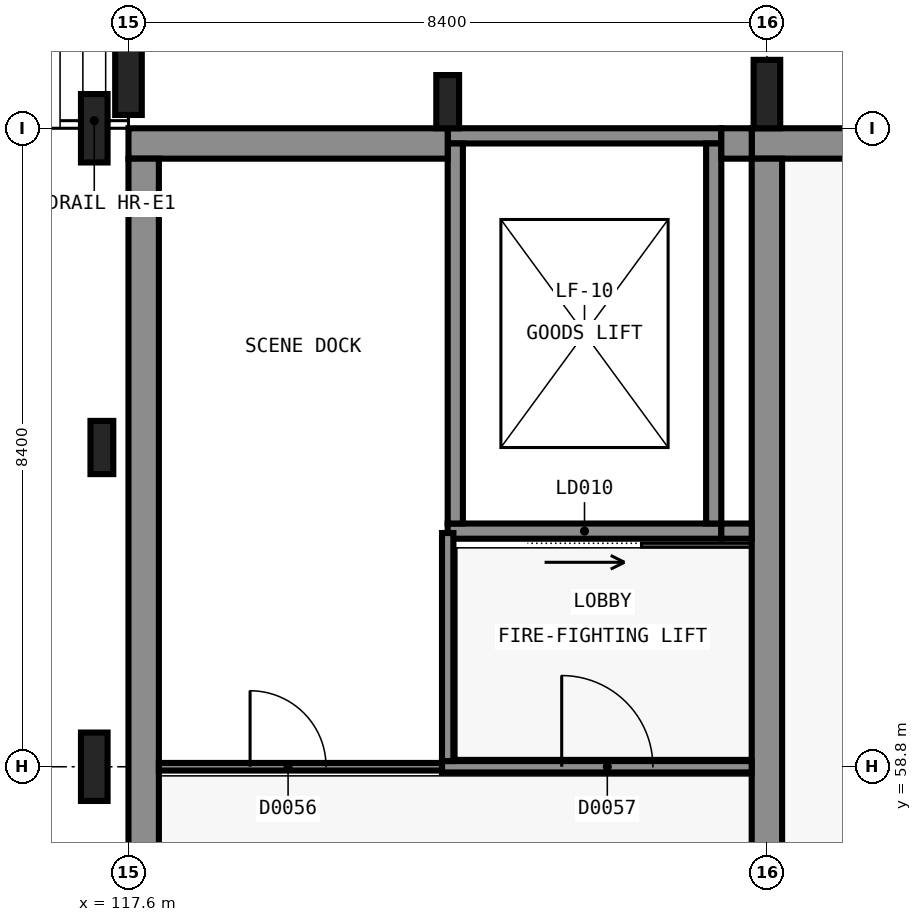
"""IFC4 building model, lengths in metres.
Left out: names, types, materials, properties, quantities, classifications, styles, units other than length and angle.
Written with IfcOpenShell. Run it as: python <this file> out.ifc"""

import sys

from ifc_helpers import new_model, si_unit, direction, frame, frame_2d, origin, origin_2d, place, context, subcontext, project, spatial, rectangle, extrude, element, fill, save


model = new_model("IFC4")
c1 = context("Model", 3, precision=1e-05, world=origin(), true_north=direction((0.0, 1.0)))
c2 = subcontext(c1, "Body", "Model", "MODEL_VIEW")
j1 = project(units=[si_unit("LENGTHUNIT", "METRE"), si_unit("PLANEANGLEUNIT", "RADIAN")], contexts=[c1])
p1 = place(None, origin())
s1 = spatial("IfcSite", under=j1, at=p1, CompositionType="ELEMENT")
p2 = place(p1, origin())
s2 = spatial("IfcBuilding", under=s1, at=p2, CompositionType="ELEMENT")
p3 = place(p2, origin())
s3 = spatial("IfcBuildingStorey", under=s2, at=p3, CompositionType="ELEMENT", Elevation=0.0)
p4 = place(p3, frame((125.4, 61.9, -1.6), z_axis=(0.0, 0.0, 1.0), x_axis=(-1.0, 0.0, 0.0)))
e1 = element("IfcWall", 1, at=p4, inside=s3, PredefinedType="SHEAR", context=c2, shape_type="SweptSolid", body=[
    extrude(rectangle(XDim=3.6, YDim=0.2, at=frame_2d((1.8, 0.0))), origin(), (0.0, 0.0, 1.0), 7.0),
])
p5 = place(p4, frame((1.05, 0.0, 1.6)))
e2 = element("IfcOpeningElement", 2, at=p5, cuts=e1, PredefinedType="OPENING", context=c2, shape_type="SweptSolid", body=[
    extrude(rectangle(XDim=1.5, YDim=2.3, at=frame_2d((0.75, 1.15))), frame((0.0, 0.11, 0.0), z_axis=(0.0, -1.0, 0.0), x_axis=(1.0, 0.0, 0.0)), (0.0, 0.0, 1.0), 0.22),
])
p6 = place(p3, frame((121.8, 67.1, -1.6), z_axis=(0.0, 0.0, 1.0), x_axis=(1.0, 0.0, 0.0)))
e3 = element("IfcWall", 3, at=p6, inside=s3, PredefinedType="SHEAR", context=c2, shape_type="SweptSolid", body=[
    extrude(rectangle(XDim=3.6, YDim=0.2, at=frame_2d((1.8, 0.0))), origin(), (0.0, 0.0, 1.0), 7.0),
])
for number, where, z_axis, x_axis in (
    (4, (121.9, 62.0, -1.6), (0.0, 0.0, 1.0), (0.0, 1.0, 0.0)),
    (5, (125.3, 67.0, -1.6), (0.0, 0.0, 1.0), (0.0, -1.0, 0.0)),
):
    element("IfcWall", number, at=place(p3, frame(where, z_axis=z_axis, x_axis=x_axis)), inside=s3, PredefinedType="SHEAR", context=c2, shape_type="SweptSolid", body=[
        extrude(rectangle(XDim=5.0, YDim=0.2, at=frame_2d((2.5, 0.0))), origin(), (0.0, 0.0, 1.0), 7.0),
    ])
p7 = place(p3, frame((125.8, 67.0, -0.3), z_axis=(0.0, 0.0, 1.0), x_axis=(1.0, 0.0, 0.0)))
e6 = element("IfcWall", 6, at=p7, inside=s3, PredefinedType="SHEAR", context=c2, shape_type="SweptSolid", body=[
    extrude(rectangle(XDim=21.4, YDim=0.4, at=frame_2d((10.7, 0.0))), origin(), (0.0, 0.0, 1.0), 5.7),
])
p8 = place(p3, frame((126.0, 38.0, -0.3), z_axis=(0.0, 0.0, 1.0), x_axis=(0.0, 1.0, 0.0)))
e7 = element("IfcWall", 7, at=p8, inside=s3, PredefinedType="SHEAR", context=c2, shape_type="SweptSolid", body=[
    extrude(rectangle(XDim=28.8, YDim=0.4, at=frame_2d((14.4, 0.0))), origin(), (0.0, 0.0, 1.0), 5.7),
])
p9 = place(p8, frame((1.0, 0.0, 0.3)))
e8 = element("IfcOpeningElement", 8, at=p9, cuts=e7, PredefinedType="OPENING", context=c2, shape_type="SweptSolid", body=[
    extrude(rectangle(XDim=1.8, YDim=2.3, at=frame_2d((0.9, 1.15))), frame((0.0, 0.21, 0.0), z_axis=(0.0, -1.0, 0.0), x_axis=(1.0, 0.0, 0.0)), (0.0, 0.0, 1.0), 0.42),
])
p10 = place(p3, frame((117.6, 67.0, -0.3), z_axis=(0.0, 0.0, 1.0), x_axis=(1.0, 0.0, 0.0)))
e9 = element("IfcWall", 9, at=p10, inside=s3, PredefinedType="SHEAR", context=c2, shape_type="SweptSolid", body=[
    extrude(rectangle(XDim=4.2, YDim=0.4, at=frame_2d((2.1, 0.0))), origin(), (0.0, 0.0, 1.0), 5.7),
])
p11 = place(p3, frame((125.6, 66.8, -0.3), z_axis=(0.0, 0.0, 1.0), x_axis=(0.0, 1.0, 0.0)))
e10 = element("IfcWall", 10, at=p11, inside=s3, PredefinedType="SHEAR", context=c2, shape_type="SweptSolid", body=[
    extrude(rectangle(XDim=0.4, YDim=0.4, at=frame_2d((0.2, 0.0))), origin(), (0.0, 0.0, 1.0), 5.7),
])
p12 = place(p3, frame((117.8, 43.2, -0.3), z_axis=(0.0, 0.0, 1.0), x_axis=(0.0, 1.0, 0.0)))
e11 = element("IfcWall", 11, at=p12, inside=s3, PredefinedType="SHEAR", context=c2, shape_type="SweptSolid", body=[
    extrude(rectangle(XDim=23.6, YDim=0.4, at=frame_2d((11.8, 0.0))), origin(), (0.0, 0.0, 1.0), 5.7),
])
p13 = place(p3, frame((125.8, 61.9, -0.3), z_axis=(0.0, 0.0, 1.0), x_axis=(-1.0, 0.0, 0.0)))
e12 = element("IfcWall", 12, at=p13, inside=s3, PredefinedType="SHEAR", context=c2, shape_type="SweptSolid", body=[
    extrude(rectangle(XDim=0.4, YDim=0.2, at=frame_2d((0.2, 0.0))), origin(), (0.0, 0.0, 1.0), 5.7),
])
p14 = place(p3, frame((117.6, 67.825, -0.3), z_axis=(0.0, 0.0, 1.0), x_axis=(1.0, 0.0, 0.0)))
e13 = element("IfcColumn", 13, at=p14, inside=s3, PredefinedType="PILASTER", context=c2, shape_type="SweptSolid", body=[
    extrude(rectangle(XDim=0.35, YDim=0.9, at=origin_2d()), origin(), (0.0, 0.0, 1.0), 5.7),
])
p15 = place(p3, frame((121.8, 67.55, -0.3), z_axis=(0.0, 0.0, 1.0), x_axis=(1.0, 0.0, 0.0)))
e14 = element("IfcColumn", 14, at=p15, inside=s3, PredefinedType="PILASTER", context=c2, shape_type="SweptSolid", body=[
    extrude(rectangle(XDim=0.3, YDim=0.7, at=origin_2d()), origin(), (0.0, 0.0, 1.0), 5.7),
])
for number, where, z_axis, x_axis in (
    (15, (126.0, 67.65, -0.3), (0.0, 0.0, 1.0), (1.0, 0.0, 0.0)),
    (16, (117.15, 58.8, -0.3), (0.0, 0.0, 1.0), (0.0, 1.0, 0.0)),
):
    element("IfcColumn", number, at=place(p3, frame(where, z_axis=z_axis, x_axis=x_axis)), inside=s3, PredefinedType="PILASTER", context=c2, shape_type="SweptSolid", body=[
        extrude(rectangle(XDim=0.35, YDim=0.9, at=origin_2d()), origin(), (0.0, 0.0, 1.0), 5.7),
    ])
p16 = place(p3, frame((117.25, 63.0, -0.3), z_axis=(0.0, 0.0, 1.0), x_axis=(0.0, 1.0, 0.0)))
e17 = element("IfcColumn", 17, at=p16, inside=s3, PredefinedType="PILASTER", context=c2, shape_type="SweptSolid", body=[
    extrude(rectangle(XDim=0.3, YDim=0.7, at=origin_2d()), origin(), (0.0, 0.0, 1.0), 5.7),
])
p17 = place(p3, frame((117.15, 67.2, -0.3), z_axis=(0.0, 0.0, 1.0), x_axis=(0.0, 1.0, 0.0)))
e18 = element("IfcColumn", 18, at=p17, inside=s3, PredefinedType="PILASTER", context=c2, shape_type="SweptSolid", body=[
    extrude(rectangle(XDim=0.35, YDim=0.9, at=origin_2d()), origin(), (0.0, 0.0, 1.0), 5.7),
])
p18 = place(p3, frame((121.725, 58.8, 0.0), z_axis=(0.0, 0.0, 1.0), x_axis=(1.0, 0.0, 0.0)))
e19 = element("IfcWall", 19, at=p18, inside=s3, PredefinedType="SOLIDWALL", context=c2, shape_type="SweptSolid", body=[
    extrude(rectangle(XDim=4.075, YDim=0.15, at=frame_2d((2.038, 0.0))), origin(), (0.0, 0.0, 1.0), 4.4),
])
p19 = place(p18, frame((1.575, 0.0, 0.0)))
e20 = element("IfcOpeningElement", 20, at=p19, cuts=e19, PredefinedType="OPENING", context=c2, shape_type="SweptSolid", body=[
    extrude(rectangle(XDim=1.2, YDim=2.1, at=frame_2d((0.6, 1.05))), frame((0.0, 0.085, 0.0), z_axis=(0.0, -1.0, 0.0), x_axis=(1.0, 0.0, 0.0)), (0.0, 0.0, 1.0), 0.17),
])
p20 = place(p3, frame((121.8, 58.875, 0.0), z_axis=(0.0, 0.0, 1.0), x_axis=(0.0, 1.0, 0.0)))
e21 = element("IfcWall", 21, at=p20, inside=s3, PredefinedType="SOLIDWALL", context=c2, shape_type="SweptSolid", body=[
    extrude(rectangle(XDim=3.0, YDim=0.15, at=frame_2d((1.5, 0.0))), origin(), (0.0, 0.0, 1.0), 4.4),
])
p21 = place(p3, frame((118.0, 58.8, 0.0), z_axis=(0.0, 0.0, 1.0), x_axis=(1.0, 0.0, 0.0)))
e22 = element("IfcWall", 22, at=p21, inside=s3, PredefinedType="PARTITIONING", context=c2, shape_type="SweptSolid", body=[
    extrude(rectangle(XDim=3.725, YDim=0.1, at=frame_2d((1.863, 0.0))), origin(), (0.0, 0.0, 1.0), 4.4),
])
p22 = place(p21, frame((1.2, 0.0, 0.0)))
e23 = element("IfcOpeningElement", 23, at=p22, cuts=e22, PredefinedType="OPENING", context=c2, shape_type="SweptSolid", body=[
    extrude(rectangle(XDim=1.0, YDim=2.1, at=frame_2d((0.5, 1.05))), frame((0.0, 0.06, 0.0), z_axis=(0.0, -1.0, 0.0), x_axis=(1.0, 0.0, 0.0)), (0.0, 0.0, 1.0), 0.12),
])
p23 = place(p5, origin())
e24 = element("IfcDoor", 24, at=p23, inside=s3, OperationType="SLIDING_TO_LEFT", PredefinedType="DOOR", context=c2, shape_type="SweptSolid", body=[
    extrude(rectangle(XDim=1.5, YDim=2.3, at=frame_2d((0.75, 1.15))), frame((0.0, 0.025, 0.0), z_axis=(0.0, -1.0, 0.0), x_axis=(1.0, 0.0, 0.0)), (0.0, 0.0, 1.0), 0.05),
])
fill(e2, e24)
p24 = place(p22, origin())
e25 = element("IfcDoor", 25, at=p24, inside=s3, OperationType="SINGLE_SWING_LEFT", PredefinedType="DOOR", context=c2, shape_type="SweptSolid", body=[
    extrude(rectangle(XDim=1.0, YDim=2.1, at=frame_2d((0.5, 1.05))), frame((0.0, 0.025, 0.0), z_axis=(0.0, -1.0, 0.0), x_axis=(1.0, 0.0, 0.0)), (0.0, 0.0, 1.0), 0.05),
])
fill(e23, e25)
p25 = place(p19, origin())
e26 = element("IfcDoor", 26, at=p25, inside=s3, OperationType="SINGLE_SWING_RIGHT", PredefinedType="DOOR", context=c2, shape_type="SweptSolid", body=[
    extrude(rectangle(XDim=1.2, YDim=2.1, at=frame_2d((0.6, 1.05))), frame((0.0, 0.025, 0.0), z_axis=(0.0, -1.0, 0.0), x_axis=(1.0, 0.0, 0.0)), (0.0, 0.0, 1.0), 0.05),
])
fill(e20, e26)
save(model, sys.argv[1])
